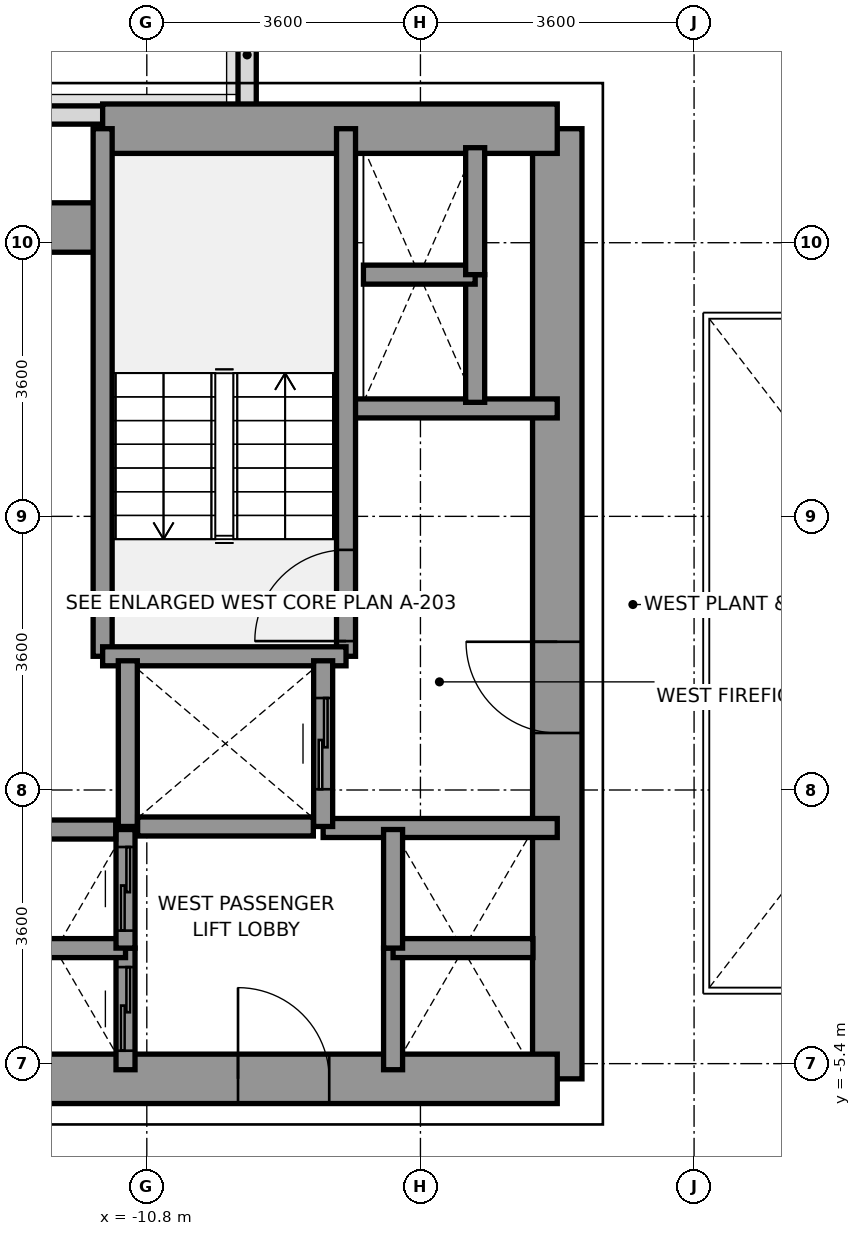
"""IFC4 building model, lengths in metres.
Left out: names, types, materials, properties, quantities, classifications, styles, units other than length and angle.
Written with IfcOpenShell. Run it as: python <this file> out.ifc"""

import sys

from ifc_helpers import new_model, si_unit, direction, frame, frame_2d, origin, place, context, subcontext, project, spatial, rectangle, extrude, source, transform, mapped, element, fill, save


model = new_model("IFC4")
c1 = context("Model", 3, precision=1e-05, world=origin(), true_north=direction((0.0, 1.0)))
c2 = subcontext(c1, "Body", "Model", "MODEL_VIEW")
j1 = project(units=[si_unit("LENGTHUNIT", "METRE"), si_unit("PLANEANGLEUNIT", "RADIAN")], contexts=[c1])
p1 = place(None, origin())
s1 = spatial("IfcSite", under=j1, at=p1, CompositionType="ELEMENT")
p2 = place(p1, origin())
s2 = spatial("IfcBuilding", under=s1, at=p2, CompositionType="ELEMENT")
p3 = place(p2, frame((0.0, 0.0, 25.2)))
s3 = spatial("IfcBuildingStorey", under=s2, at=p3, CompositionType="ELEMENT", Elevation=25.2)
p4 = place(p3, frame((-14.022, 7.08, 0.0), z_axis=(0.0, 0.0, 1.0), x_axis=(1.0, 0.0, 0.0)))
e1 = element("IfcWall", 1, at=p4, inside=s3, PredefinedType="PARAPET", context=c2, shape_type="SweptSolid", body=[
    extrude(rectangle(XDim=2.727, YDim=0.24, at=frame_2d((1.364, 0.0))), origin(), (0.0, 0.0, 1.0), 1.15),
])
p5 = place(p3, frame((-9.48, 6.953, 0.0), z_axis=(0.0, 0.0, 1.0), x_axis=(0.0, 1.0, 0.0)))
e2 = element("IfcWall", 2, at=p5, inside=s3, PredefinedType="PARAPET", context=c2, shape_type="SweptSolid", body=[
    extrude(rectangle(XDim=1.836, YDim=0.24, at=frame_2d((0.918, 0.0))), origin(), (0.0, 0.0, 1.0), 1.15),
])
p6 = place(p3, frame((-5.4, -5.6, 0.0), z_axis=(0.0, 0.0, 1.0), x_axis=(0.0, 1.0, 0.0)))
e3 = element("IfcWall", 3, at=p6, inside=s3, PredefinedType="SHEAR", context=c2, shape_type="SweptSolid", body=[
    extrude(rectangle(XDim=12.5, YDim=0.65, at=frame_2d((6.25, 0.0))), origin(), (0.0, 0.0, 1.0), 5.2),
])
p7 = place(p6, frame((4.55, 0.0, 0.0)))
e4 = element("IfcOpeningElement", 4, at=p7, cuts=e3, PredefinedType="OPENING", context=c2, shape_type="SweptSolid", body=[
    extrude(rectangle(XDim=1.2, YDim=2.2, at=frame_2d((0.6, 1.1))), frame((0.0, 0.335, 0.0), z_axis=(0.0, -1.0, 0.0), x_axis=(1.0, 0.0, 0.0)), (0.0, 0.0, 1.0), 0.67),
])
p8 = place(p3, frame((-11.381, 6.9, 0.0), z_axis=(0.0, 0.0, 1.0), x_axis=(1.0, 0.0, 0.0)))
e5 = element("IfcWall", 5, at=p8, inside=s3, PredefinedType="SHEAR", context=c2, shape_type="SweptSolid", body=[
    extrude(rectangle(XDim=5.981, YDim=0.65, at=frame_2d((2.991, 0.0))), origin(), (0.0, 0.0, 1.0), 5.2),
])
p9 = place(p3, frame((-13.2, 5.6, 0.0), z_axis=(0.0, 0.0, 1.0), x_axis=(1.0, 0.0, 0.0)))
e6 = element("IfcWall", 6, at=p9, inside=s3, PredefinedType="SHEAR", context=c2, shape_type="SweptSolid", body=[
    extrude(rectangle(XDim=1.819, YDim=0.65, at=frame_2d((0.909, 0.0))), origin(), (0.0, 0.0, 1.0), 5.2),
])
p10 = place(p3, frame((-13.2, -5.6, 0.0), z_axis=(0.0, 0.0, 1.0), x_axis=(1.0, 0.0, 0.0)))
e7 = element("IfcWall", 7, at=p10, inside=s3, PredefinedType="SHEAR", context=c2, shape_type="SweptSolid", body=[
    extrude(rectangle(XDim=7.8, YDim=0.65, at=frame_2d((3.9, 0.0))), origin(), (0.0, 0.0, 1.0), 5.2),
])
p11 = place(p10, frame((3.6, 0.0, 0.0)))
e8 = element("IfcOpeningElement", 8, at=p11, cuts=e7, PredefinedType="OPENING", context=c2, shape_type="SweptSolid", body=[
    extrude(rectangle(XDim=1.2, YDim=2.2, at=frame_2d((0.6, 1.1))), frame((0.0, 0.335, 0.0), z_axis=(0.0, -1.0, 0.0), x_axis=(1.0, 0.0, 0.0)), (0.0, 0.0, 1.0), 0.67),
])
p12 = place(p3, frame((-8.18, 3.22, 0.0), z_axis=(0.0, 0.0, 1.0), x_axis=(1.0, 0.0, 0.0)))
e9 = element("IfcWall", 9, at=p12, inside=s3, PredefinedType="SOLIDWALL", context=c2, shape_type="SweptSolid", body=[
    extrude(rectangle(XDim=2.78, YDim=0.25, at=frame_2d((1.39, 0.0))), origin(), (0.0, 0.0, 1.0), 5.2),
])
p13 = place(p3, frame((-8.48, -2.3, 0.0), z_axis=(0.0, 0.0, 1.0), x_axis=(1.0, 0.0, 0.0)))
e10 = element("IfcWall", 10, at=p13, inside=s3, PredefinedType="SOLIDWALL", context=c2, shape_type="SweptSolid", body=[
    extrude(rectangle(XDim=3.08, YDim=0.25, at=frame_2d((1.54, 0.0))), origin(), (0.0, 0.0, 1.0), 5.2),
])
p14 = place(p3, frame((-8.179, -0.041, 0.0), z_axis=(0.0, 0.0, 1.0), x_axis=(0.0, 1.0, 0.0)))
e11 = element("IfcWall", 11, at=p14, inside=s3, PredefinedType="SOLIDWALL", context=c2, shape_type="SweptSolid", body=[
    extrude(rectangle(XDim=6.941, YDim=0.25, at=frame_2d((3.47, 0.0))), origin(), (0.0, 0.0, 1.0), 5.2),
])
p15 = place(p14, frame((0.2, 0.0, 0.0)))
e12 = element("IfcOpeningElement", 12, at=p15, cuts=e11, PredefinedType="OPENING", context=c2, shape_type="SweptSolid", body=[
    extrude(rectangle(XDim=1.2, YDim=2.2, at=frame_2d((0.6, 1.1))), frame((0.0, 0.135, 0.0), z_axis=(0.0, -1.0, 0.0), x_axis=(1.0, 0.0, 0.0)), (0.0, 0.0, 1.0), 0.27),
])
p16 = place(p3, frame((-11.381, -0.041, 0.0), z_axis=(0.0, 0.0, 1.0), x_axis=(0.0, 1.0, 0.0)))
e13 = element("IfcWall", 13, at=p16, inside=s3, PredefinedType="SOLIDWALL", context=c2, shape_type="SweptSolid", body=[
    extrude(rectangle(XDim=6.941, YDim=0.25, at=frame_2d((3.47, 0.0))), origin(), (0.0, 0.0, 1.0), 5.2),
])
p17 = place(p3, frame((-11.381, -0.041, 0.0), z_axis=(0.0, 0.0, 1.0), x_axis=(1.0, 0.0, 0.0)))
e14 = element("IfcWall", 14, at=p17, inside=s3, PredefinedType="SOLIDWALL", context=c2, shape_type="SweptSolid", body=[
    extrude(rectangle(XDim=3.202, YDim=0.25, at=frame_2d((1.601, 0.0))), origin(), (0.0, 0.0, 1.0), 5.2),
])
p18 = place(p3, frame((-11.05, -2.28, 0.0), z_axis=(0.0, 0.0, 1.0), x_axis=(0.0, 1.0, 0.0)))
e15 = element("IfcWall", 15, at=p18, inside=s3, PredefinedType="SOLIDWALL", context=c2, shape_type="SweptSolid", body=[
    extrude(rectangle(XDim=2.18, YDim=0.25, at=frame_2d((1.09, 0.0))), origin(), (0.0, 0.0, 1.0), 5.2),
])
p19 = place(p3, frame((-8.48, -2.28, 0.0), z_axis=(0.0, 0.0, 1.0), x_axis=(0.0, 1.0, 0.0)))
e16 = element("IfcWall", 16, at=p19, inside=s3, PredefinedType="SOLIDWALL", context=c2, shape_type="SweptSolid", body=[
    extrude(rectangle(XDim=2.18, YDim=0.25, at=frame_2d((1.09, 0.0))), origin(), (0.0, 0.0, 1.0), 5.2),
])
p20 = place(p19, frame((0.49, 0.0, 0.0)))
e17 = element("IfcOpeningElement", 17, at=p20, cuts=e16, PredefinedType="OPENING", context=c2, shape_type="SweptSolid", body=[
    extrude(rectangle(XDim=1.2, YDim=2.2, at=frame_2d((0.6, 1.1))), frame((0.0, 0.135, 0.0), z_axis=(0.0, -1.0, 0.0), x_axis=(1.0, 0.0, 0.0)), (0.0, 0.0, 1.0), 0.27),
])
p21 = place(p3, frame((-10.921, -2.28, 0.0), z_axis=(0.0, 0.0, 1.0), x_axis=(1.0, 0.0, 0.0)))
e18 = element("IfcWall", 18, at=p21, inside=s3, PredefinedType="SOLIDWALL", context=c2, shape_type="SweptSolid", body=[
    extrude(rectangle(XDim=2.312, YDim=0.25, at=frame_2d((1.156, 0.0))), origin(), (0.0, 0.0, 1.0), 5.2),
])
p22 = place(p3, frame((-11.08, -5.48, 0.0), z_axis=(0.0, 0.0, 1.0), x_axis=(0.0, 1.0, 0.0)))
e19 = element("IfcWall", 19, at=p22, inside=s3, PredefinedType="SOLIDWALL", context=c2, shape_type="SweptSolid", body=[
    extrude(rectangle(XDim=1.6, YDim=0.25, at=frame_2d((0.8, 0.0))), origin(), (0.0, 0.0, 1.0), 5.2),
])
p23 = place(p22, frame((0.25, 0.0, 0.0)))
e20 = element("IfcOpeningElement", 20, at=p23, cuts=e19, PredefinedType="OPENING", context=c2, shape_type="SweptSolid", body=[
    extrude(rectangle(XDim=1.1, YDim=2.2, at=frame_2d((0.55, 1.1))), frame((0.0, 0.135, 0.0), z_axis=(0.0, -1.0, 0.0), x_axis=(1.0, 0.0, 0.0)), (0.0, 0.0, 1.0), 0.27),
])
p24 = place(p3, frame((-12.92, -3.88, 0.0), z_axis=(0.0, 0.0, 1.0), x_axis=(1.0, 0.0, 0.0)))
e21 = element("IfcWall", 21, at=p24, inside=s3, PredefinedType="SOLIDWALL", context=c2, shape_type="SweptSolid", body=[
    extrude(rectangle(XDim=1.84, YDim=0.25, at=frame_2d((0.92, 0.0))), origin(), (0.0, 0.0, 1.0), 5.2),
])
p25 = place(p3, frame((-11.08, -3.88, 0.0), z_axis=(0.0, 0.0, 1.0), x_axis=(0.0, 1.0, 0.0)))
e22 = element("IfcWall", 22, at=p25, inside=s3, PredefinedType="SOLIDWALL", context=c2, shape_type="SweptSolid", body=[
    extrude(rectangle(XDim=1.56, YDim=0.25, at=frame_2d((0.78, 0.0))), origin(), (0.0, 0.0, 1.0), 5.2),
])
p26 = place(p25, frame((0.23, 0.0, 0.0)))
e23 = element("IfcOpeningElement", 23, at=p26, cuts=e22, PredefinedType="OPENING", context=c2, shape_type="SweptSolid", body=[
    extrude(rectangle(XDim=1.1, YDim=2.2, at=frame_2d((0.55, 1.1))), frame((0.0, 0.135, 0.0), z_axis=(0.0, -1.0, 0.0), x_axis=(1.0, 0.0, 0.0)), (0.0, 0.0, 1.0), 0.27),
])
p27 = place(p3, frame((-12.791, -2.32, 0.0), z_axis=(0.0, 0.0, 1.0), x_axis=(1.0, 0.0, 0.0)))
e24 = element("IfcWall", 24, at=p27, inside=s3, PredefinedType="SOLIDWALL", context=c2, shape_type="SweptSolid", body=[
    extrude(rectangle(XDim=1.582, YDim=0.25, at=frame_2d((0.791, 0.0))), origin(), (0.0, 0.0, 1.0), 5.2),
])
p28 = place(p3, frame((-7.56, -5.48, 0.0), z_axis=(0.0, 0.0, 1.0), x_axis=(0.0, 1.0, 0.0)))
e25 = element("IfcWall", 25, at=p28, inside=s3, PredefinedType="SOLIDWALL", context=c2, shape_type="SweptSolid", body=[
    extrude(rectangle(XDim=1.6, YDim=0.25, at=frame_2d((0.8, 0.0))), origin(), (0.0, 0.0, 1.0), 5.2),
])
p29 = place(p3, frame((-7.56, -3.88, 0.0), z_axis=(0.0, 0.0, 1.0), x_axis=(1.0, 0.0, 0.0)))
e26 = element("IfcWall", 26, at=p29, inside=s3, PredefinedType="SOLIDWALL", context=c2, shape_type="SweptSolid", body=[
    extrude(rectangle(XDim=1.84, YDim=0.25, at=frame_2d((0.92, 0.0))), origin(), (0.0, 0.0, 1.0), 5.2),
])
p30 = place(p3, frame((-7.56, -3.88, 0.0), z_axis=(0.0, 0.0, 1.0), x_axis=(0.0, 1.0, 0.0)))
e27 = element("IfcWall", 27, at=p30, inside=s3, PredefinedType="SOLIDWALL", context=c2, shape_type="SweptSolid", body=[
    extrude(rectangle(XDim=1.56, YDim=0.25, at=frame_2d((0.78, 0.0))), origin(), (0.0, 0.0, 1.0), 5.2),
])
p31 = place(p3, frame((-6.48, 3.3, 0.0), z_axis=(0.0, 0.0, 1.0), x_axis=(0.0, 1.0, 0.0)))
e28 = element("IfcWall", 28, at=p31, inside=s3, PredefinedType="SOLIDWALL", context=c2, shape_type="SweptSolid", body=[
    extrude(rectangle(XDim=1.68, YDim=0.25, at=frame_2d((0.84, 0.0))), origin(), (0.0, 0.0, 1.0), 5.2),
])
p32 = place(p3, frame((-7.95, 4.98, 0.0), z_axis=(0.0, 0.0, 1.0), x_axis=(1.0, 0.0, 0.0)))
e29 = element("IfcWall", 29, at=p32, inside=s3, PredefinedType="SOLIDWALL", context=c2, shape_type="SweptSolid", body=[
    extrude(rectangle(XDim=1.47, YDim=0.25, at=frame_2d((0.735, 0.0))), origin(), (0.0, 0.0, 1.0), 5.2),
])
p33 = place(p3, frame((-6.48, 4.98, 0.0), z_axis=(0.0, 0.0, 1.0), x_axis=(0.0, 1.0, 0.0)))
e30 = element("IfcWall", 30, at=p33, inside=s3, PredefinedType="SOLIDWALL", context=c2, shape_type="SweptSolid", body=[
    extrude(rectangle(XDim=1.67, YDim=0.25, at=frame_2d((0.835, 0.0))), origin(), (0.0, 0.0, 1.0), 5.2),
])
m1 = source(origin(), c2, "Body", "SweptSolid", [
    extrude(rectangle(XDim=1.2, YDim=2.2, at=frame_2d((0.6, 1.1))), frame((0.0, 0.025, 0.0), z_axis=(0.0, -1.0, 0.0), x_axis=(1.0, 0.0, 0.0)), (0.0, 0.0, 1.0), 0.05),
])
p34 = place(p15, origin())
e31 = element("IfcDoor", 31, at=p34, inside=s3, OperationType="SINGLE_SWING_LEFT", PredefinedType="DOOR", context=c2, shape_type="MappedRepresentation", body=[
    mapped(m1, transform((0.0, 0.0, 0.0), x_axis=(1.0, 0.0, 0.0), y_axis=(0.0, 1.0, 0.0), z_axis=(0.0, 0.0, 1.0), scale=1.0)),
])
fill(e12, e31)
p35 = place(p7, origin())
e32 = element("IfcDoor", 32, at=p35, inside=s3, OperationType="SINGLE_SWING_RIGHT", PredefinedType="DOOR", context=c2, shape_type="MappedRepresentation", body=[
    mapped(m1, transform((0.0, 0.0, 0.0), x_axis=(1.0, 0.0, 0.0), y_axis=(0.0, 1.0, 0.0), z_axis=(0.0, 0.0, 1.0), scale=1.0)),
])
fill(e4, e32)
p36 = place(p11, origin())
e33 = element("IfcDoor", 33, at=p36, inside=s3, OperationType="SINGLE_SWING_LEFT", PredefinedType="DOOR", context=c2, shape_type="MappedRepresentation", body=[
    mapped(m1, transform((0.0, 0.0, 0.0), x_axis=(1.0, 0.0, 0.0), y_axis=(0.0, 1.0, 0.0), z_axis=(0.0, 0.0, 1.0), scale=1.0)),
])
fill(e8, e33)
p37 = place(p20, origin())
e34 = element("IfcDoor", 34, at=p37, inside=s3, OperationType="SLIDING_TO_RIGHT", PredefinedType="DOOR", context=c2, shape_type="MappedRepresentation", body=[
    mapped(m1, transform((0.0, 0.0, 0.0), x_axis=(1.0, 0.0, 0.0), y_axis=(0.0, 1.0, 0.0), z_axis=(0.0, 0.0, 1.0), scale=1.0)),
])
fill(e17, e34)
m2 = source(origin(), c2, "Body", "SweptSolid", [
    extrude(rectangle(XDim=1.1, YDim=2.2, at=frame_2d((0.55, 1.1))), frame((0.0, 0.025, 0.0), z_axis=(0.0, -1.0, 0.0), x_axis=(1.0, 0.0, 0.0)), (0.0, 0.0, 1.0), 0.05),
])
p38 = place(p23, origin())
e35 = element("IfcDoor", 35, at=p38, inside=s3, OperationType="SLIDING_TO_LEFT", PredefinedType="DOOR", context=c2, shape_type="MappedRepresentation", body=[
    mapped(m2, transform((0.0, 0.0, 0.0), x_axis=(1.0, 0.0, 0.0), y_axis=(0.0, 1.0, 0.0), z_axis=(0.0, 0.0, 1.0), scale=1.0)),
])
fill(e20, e35)
p39 = place(p26, origin())
e36 = element("IfcDoor", 36, at=p39, inside=s3, OperationType="SLIDING_TO_LEFT", PredefinedType="DOOR", context=c2, shape_type="MappedRepresentation", body=[
    mapped(m2, transform((0.0, 0.0, 0.0), x_axis=(1.0, 0.0, 0.0), y_axis=(0.0, 1.0, 0.0), z_axis=(0.0, 0.0, 1.0), scale=1.0)),
])
fill(e23, e36)
save(model, sys.argv[1])
